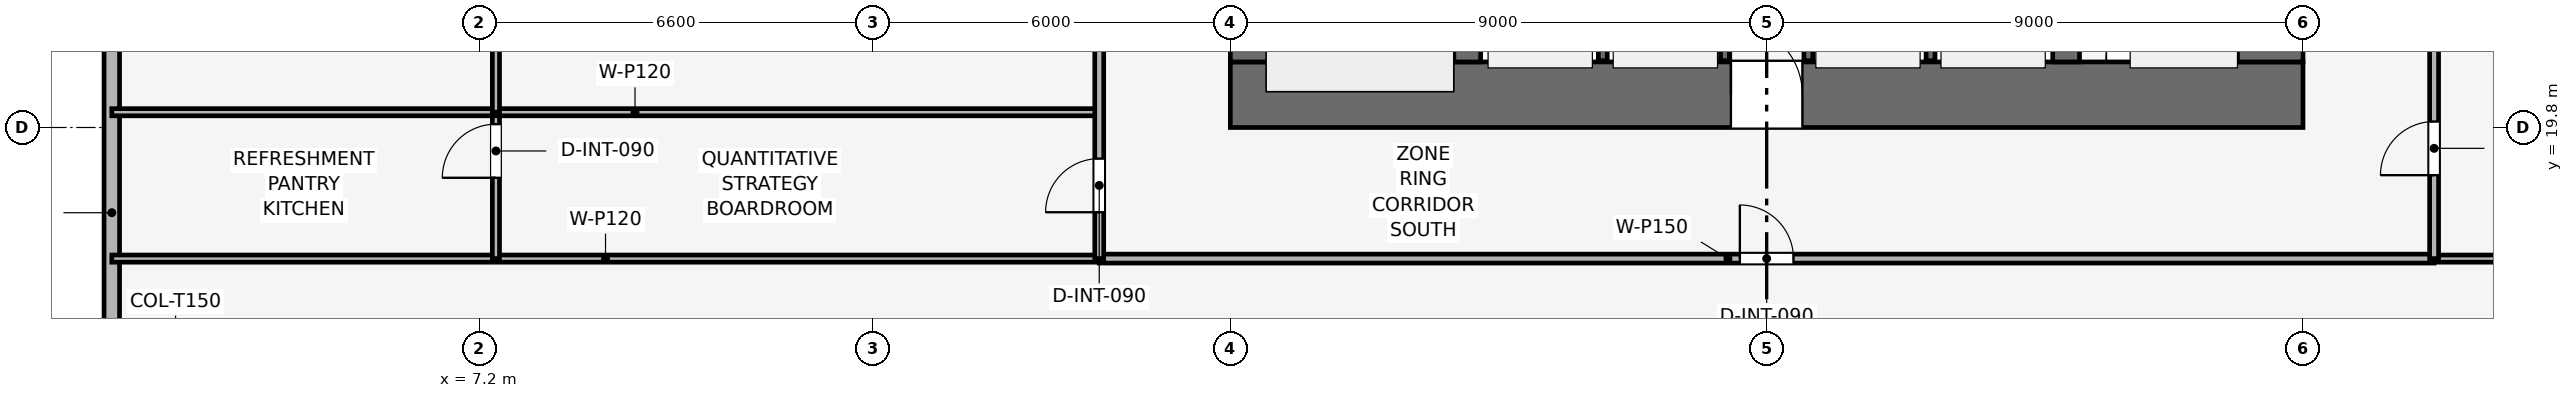
"""IFC4 building model, lengths in metres.
Left out: names, types, materials, properties, quantities, classifications, styles, units other than length and angle.
Written with IfcOpenShell. Run it as: python <this file> out.ifc"""

import sys

from ifc_helpers import new_model, si_unit, direction, frame, frame_2d, origin, place, context, subcontext, project, spatial, rectangle, extrude, element, fill, save


model = new_model("IFC4")
c1 = context("Model", 3, precision=1e-05, world=origin(), true_north=direction((0.0, 1.0)))
c2 = subcontext(c1, "Body", "Model", "MODEL_VIEW")
j1 = project(units=[si_unit("LENGTHUNIT", "METRE"), si_unit("PLANEANGLEUNIT", "RADIAN")], contexts=[c1])
p1 = place(None, origin())
s1 = spatial("IfcSite", under=j1, at=p1, CompositionType="ELEMENT")
p2 = place(p1, origin())
s2 = spatial("IfcBuilding", under=s1, at=p2, CompositionType="ELEMENT")
p3 = place(p2, frame((0.0, 0.0, 100.2)))
s3 = spatial("IfcBuildingStorey", under=s2, at=p3, CompositionType="ELEMENT", Elevation=100.2)
p4 = place(p3, frame((19.8, 20.35, 0.0), z_axis=(0.0, 0.0, 1.0), x_axis=(1.0, 0.0, 0.0)))
e1 = element("IfcWall", 1, at=p4, inside=s3, PredefinedType="SHEAR", context=c2, shape_type="SweptSolid", body=[
    extrude(rectangle(XDim=18.0, YDim=1.1, at=frame_2d((9.0, 0.0))), origin(), (0.0, 0.0, 1.0), 3.9),
])
p5 = place(p4, frame((8.4, 0.0, 0.0)))
e2 = element("IfcOpeningElement", 2, at=p5, cuts=e1, PredefinedType="OPENING", context=c2, shape_type="SweptSolid", body=[
    extrude(rectangle(XDim=1.2, YDim=2.2, at=frame_2d((0.6, 1.1))), frame((0.0, 0.56, 0.0), z_axis=(0.0, -1.0, 0.0), x_axis=(1.0, 0.0, 0.0)), (0.0, 0.0, 1.0), 1.12),
])
p6 = place(p3, frame((20.35, 20.9, 0.0), z_axis=(0.0, 0.0, 1.0), x_axis=(0.0, 1.0, 0.0)))
e3 = element("IfcWall", 3, at=p6, inside=s3, PredefinedType="SHEAR", context=c2, shape_type="SweptSolid", body=[
    extrude(rectangle(XDim=15.8, YDim=1.1, at=frame_2d((7.9, 0.0))), origin(), (0.0, 0.0, 1.0), 3.9),
])
p7 = place(p6, frame((9.9, 0.0, 0.0)))
e4 = element("IfcOpeningElement", 4, at=p7, cuts=e3, PredefinedType="OPENING", context=c2, shape_type="SweptSolid", body=[
    extrude(rectangle(XDim=1.1, YDim=2.15, at=frame_2d((0.55, 1.075))), frame((0.0, 0.56, 0.0), z_axis=(0.0, -1.0, 0.0), x_axis=(1.0, 0.0, 0.0)), (0.0, 0.0, 1.0), 1.12),
])
p8 = place(p3, frame((37.25, 20.9, 0.0), z_axis=(0.0, 0.0, 1.0), x_axis=(0.0, 1.0, 0.0)))
e5 = element("IfcWall", 5, at=p8, inside=s3, PredefinedType="SHEAR", context=c2, shape_type="SweptSolid", body=[
    extrude(rectangle(XDim=15.8, YDim=1.1, at=frame_2d((7.9, 0.0))), origin(), (0.0, 0.0, 1.0), 3.9),
])
p9 = place(p8, frame((4.4, 0.0, 0.0)))
e6 = element("IfcOpeningElement", 6, at=p9, cuts=e5, PredefinedType="OPENING", context=c2, shape_type="SweptSolid", body=[
    extrude(rectangle(XDim=1.1, YDim=2.15, at=frame_2d((0.55, 1.075))), frame((0.0, 0.56, 0.0), z_axis=(0.0, -1.0, 0.0), x_axis=(1.0, 0.0, 0.0)), (0.0, 0.0, 1.0), 1.12),
])
for number, where, z_axis, x_axis in (
    (7, (23.775, 20.9, 0.0), (0.0, 0.0, 1.0), (0.0, 1.0, 0.0)),
    (8, (33.825, 20.9, 0.0), (0.0, 0.0, 1.0), (0.0, 1.0, 0.0)),
):
    element("IfcWall", number, at=place(p3, frame(where, z_axis=z_axis, x_axis=x_axis)), inside=s3, PredefinedType="SHEAR", context=c2, shape_type="SweptSolid", body=[
        extrude(rectangle(XDim=15.8, YDim=0.45, at=frame_2d((7.9, 0.0))), origin(), (0.0, 0.0, 1.0), 3.9),
    ])
p10 = place(p3, frame((1.03, 8.7, 0.0), z_axis=(0.0, 0.0, 1.0), x_axis=(0.0, 1.0, 0.0)))
e9 = element("IfcWall", 9, at=p10, inside=s3, PredefinedType="SOLIDWALL", context=c2, shape_type="SweptSolid", body=[
    extrude(rectangle(XDim=15.3, YDim=0.26, at=frame_2d((7.65, 0.0))), origin(), (0.0, 0.0, 1.0), 3.65),
])
p11 = place(p10, frame((0.25, 0.0, 0.9)))
e10 = element("IfcOpeningElement", 10, at=p11, cuts=e9, PredefinedType="OPENING", context=c2, shape_type="SweptSolid", body=[
    extrude(rectangle(XDim=3.8, YDim=1.9, at=frame_2d((1.9, 0.95))), frame((0.0, 0.14, 0.0), z_axis=(0.0, -1.0, 0.0), x_axis=(1.0, 0.0, 0.0)), (0.0, 0.0, 1.0), 0.28),
])
for number, where, z_axis, x_axis in (
    (11, (26.05, 20.92, 0.0), (0.0, 0.0, 1.0), (0.0, 1.0, 0.0)),
    (12, (28.1, 20.92, 0.0), (0.0, 0.0, 1.0), (0.0, 1.0, 0.0)),
    (13, (29.5, 20.92, 0.0), (0.0, 0.0, 1.0), (0.0, 1.0, 0.0)),
    (14, (31.55, 20.92, 0.0), (0.0, 0.0, 1.0), (0.0, 1.0, 0.0)),
):
    element("IfcWall", number, at=place(p3, frame(where, z_axis=z_axis, x_axis=x_axis)), inside=s3, PredefinedType="SHEAR", context=c2, shape_type="SweptSolid", body=[
        extrude(rectangle(XDim=2.06, YDim=0.15, at=frame_2d((1.03, 0.0))), origin(), (0.0, 0.0, 1.0), 3.65),
    ])
for number, where, z_axis, x_axis in (
    (15, (1.03, 17.6, 0.0), (0.0, 0.0, 1.0), (1.0, 0.0, 0.0)),
    (16, (40.0, 17.6, 0.0), (0.0, 0.0, 1.0), (1.0, 0.0, 0.0)),
):
    element("IfcWall", number, at=place(p3, frame(where, z_axis=z_axis, x_axis=x_axis)), inside=s3, PredefinedType="PARTITIONING", context=c2, shape_type="SweptSolid", body=[
        extrude(rectangle(XDim=16.57, YDim=0.12, at=frame_2d((8.285, 0.0))), origin(), (0.0, 0.0, 1.0), 2.935),
    ])
p12 = place(p3, frame((7.476, 17.6, 0.0), z_axis=(0.0, 0.0, 1.0), x_axis=(0.0, 1.0, 0.0)))
e17 = element("IfcWall", 17, at=p12, inside=s3, PredefinedType="PARTITIONING", context=c2, shape_type="SweptSolid", body=[
    extrude(rectangle(XDim=2.456, YDim=0.12, at=frame_2d((1.228, 0.0))), origin(), (0.0, 0.0, 1.0), 3.65),
])
p13 = place(p12, frame((1.356, 0.0, 0.0)))
e18 = element("IfcOpeningElement", 18, at=p13, cuts=e17, PredefinedType="OPENING", context=c2, shape_type="SweptSolid", body=[
    extrude(rectangle(XDim=0.9, YDim=2.1, at=frame_2d((0.45, 1.05))), frame((0.0, 0.07, 0.0), z_axis=(0.0, -1.0, 0.0), x_axis=(1.0, 0.0, 0.0)), (0.0, 0.0, 1.0), 0.14),
])
p14 = place(p3, frame((1.03, 20.056, 0.0), z_axis=(0.0, 0.0, 1.0), x_axis=(1.0, 0.0, 0.0)))
e19 = element("IfcWall", 19, at=p14, inside=s3, PredefinedType="PARTITIONING", context=c2, shape_type="SweptSolid", body=[
    extrude(rectangle(XDim=16.57, YDim=0.12, at=frame_2d((8.285, 0.0))), origin(), (0.0, 0.0, 1.0), 2.935),
])
p15 = place(p3, frame((7.476, 20.056, 0.0), z_axis=(0.0, 0.0, 1.0), x_axis=(0.0, 1.0, 0.0)))
e20 = element("IfcWall", 20, at=p15, inside=s3, PredefinedType="PARTITIONING", context=c2, shape_type="SweptSolid", body=[
    extrude(rectangle(XDim=8.731, YDim=0.12, at=frame_2d((4.366, 0.0))), origin(), (0.0, 0.0, 1.0), 3.085),
])
p16 = place(p15, frame((1.438, 0.0, 0.0)))
e21 = element("IfcOpeningElement", 21, at=p16, cuts=e20, PredefinedType="OPENING", context=c2, shape_type="SweptSolid", body=[
    extrude(rectangle(XDim=0.9, YDim=2.1, at=frame_2d((0.45, 1.05))), frame((0.0, 0.07, 0.0), z_axis=(0.0, -1.0, 0.0), x_axis=(1.0, 0.0, 0.0)), (0.0, 0.0, 1.0), 0.14),
])
p17 = place(p3, frame((17.6, 17.6, 0.0), z_axis=(0.0, 0.0, 1.0), x_axis=(1.0, 0.0, 0.0)))
e22 = element("IfcWall", 22, at=p17, inside=s3, PredefinedType="PARTITIONING", context=c2, shape_type="SweptSolid", body=[
    extrude(rectangle(XDim=22.4, YDim=0.15, at=frame_2d((11.2, 0.0))), origin(), (0.0, 0.0, 1.0), 3.085),
])
p18 = place(p17, frame((10.75, 0.0, 0.0)))
e23 = element("IfcOpeningElement", 23, at=p18, cuts=e22, PredefinedType="OPENING", context=c2, shape_type="SweptSolid", body=[
    extrude(rectangle(XDim=0.9, YDim=2.1, at=frame_2d((0.45, 1.05))), frame((0.0, 0.085, 0.0), z_axis=(0.0, -1.0, 0.0), x_axis=(1.0, 0.0, 0.0)), (0.0, 0.0, 1.0), 0.17),
])
p19 = place(p3, frame((17.6, 17.6, 0.0), z_axis=(0.0, 0.0, 1.0), x_axis=(0.0, 1.0, 0.0)))
e24 = element("IfcWall", 24, at=p19, inside=s3, PredefinedType="PARTITIONING", context=c2, shape_type="SweptSolid", body=[
    extrude(rectangle(XDim=22.4, YDim=0.15, at=frame_2d((11.2, 0.0))), origin(), (0.0, 0.0, 1.0), 3.085),
])
p20 = place(p19, frame((0.778, 0.0, 0.0)))
e25 = element("IfcOpeningElement", 25, at=p20, cuts=e24, PredefinedType="OPENING", context=c2, shape_type="SweptSolid", body=[
    extrude(rectangle(XDim=0.9, YDim=2.1, at=frame_2d((0.45, 1.05))), frame((0.0, 0.085, 0.0), z_axis=(0.0, -1.0, 0.0), x_axis=(1.0, 0.0, 0.0)), (0.0, 0.0, 1.0), 0.17),
])
p21 = place(p19, frame((6.372, 0.0, 0.0)))
e26 = element("IfcOpeningElement", 26, at=p21, cuts=e24, PredefinedType="OPENING", context=c2, shape_type="SweptSolid", body=[
    extrude(rectangle(XDim=0.9, YDim=2.1, at=frame_2d((0.45, 1.05))), frame((0.0, 0.085, 0.0), z_axis=(0.0, -1.0, 0.0), x_axis=(1.0, 0.0, 0.0)), (0.0, 0.0, 1.0), 0.17),
])
p22 = place(p19, frame((16.343, 0.0, 0.0)))
e27 = element("IfcOpeningElement", 27, at=p22, cuts=e24, PredefinedType="OPENING", context=c2, shape_type="SweptSolid", body=[
    extrude(rectangle(XDim=0.9, YDim=2.1, at=frame_2d((0.45, 1.05))), frame((0.0, 0.085, 0.0), z_axis=(0.0, -1.0, 0.0), x_axis=(1.0, 0.0, 0.0)), (0.0, 0.0, 1.0), 0.17),
])
p23 = place(p3, frame((40.0, 17.6, 0.0), z_axis=(0.0, 0.0, 1.0), x_axis=(0.0, 1.0, 0.0)))
e28 = element("IfcWall", 28, at=p23, inside=s3, PredefinedType="PARTITIONING", context=c2, shape_type="SweptSolid", body=[
    extrude(rectangle(XDim=22.4, YDim=0.15, at=frame_2d((11.2, 0.0))), origin(), (0.0, 0.0, 1.0), 3.085),
])
p24 = place(p23, frame((1.4, 0.0, 0.0)))
e29 = element("IfcOpeningElement", 29, at=p24, cuts=e28, PredefinedType="OPENING", context=c2, shape_type="SweptSolid", body=[
    extrude(rectangle(XDim=0.9, YDim=2.1, at=frame_2d((0.45, 1.05))), frame((0.0, 0.085, 0.0), z_axis=(0.0, -1.0, 0.0), x_axis=(1.0, 0.0, 0.0)), (0.0, 0.0, 1.0), 0.17),
])
p25 = place(p23, frame((4.65, 0.0, 0.0)))
e30 = element("IfcOpeningElement", 30, at=p25, cuts=e28, PredefinedType="OPENING", context=c2, shape_type="SweptSolid", body=[
    extrude(rectangle(XDim=0.9, YDim=2.1, at=frame_2d((0.45, 1.05))), frame((0.0, 0.085, 0.0), z_axis=(0.0, -1.0, 0.0), x_axis=(1.0, 0.0, 0.0)), (0.0, 0.0, 1.0), 0.17),
])
p26 = place(p23, frame((7.55, 0.0, 0.0)))
e31 = element("IfcOpeningElement", 31, at=p26, cuts=e28, PredefinedType="OPENING", context=c2, shape_type="SweptSolid", body=[
    extrude(rectangle(XDim=0.9, YDim=2.1, at=frame_2d((0.45, 1.05))), frame((0.0, 0.085, 0.0), z_axis=(0.0, -1.0, 0.0), x_axis=(1.0, 0.0, 0.0)), (0.0, 0.0, 1.0), 0.17),
])
p27 = place(p23, frame((10.3, 0.0, 0.0)))
e32 = element("IfcOpeningElement", 32, at=p27, cuts=e28, PredefinedType="OPENING", context=c2, shape_type="SweptSolid", body=[
    extrude(rectangle(XDim=0.95, YDim=2.1, at=frame_2d((0.475, 1.05))), frame((0.0, 0.085, 0.0), z_axis=(0.0, -1.0, 0.0), x_axis=(1.0, 0.0, 0.0)), (0.0, 0.0, 1.0), 0.17),
])
p28 = place(p23, frame((16.8, 0.0, 0.0)))
e33 = element("IfcOpeningElement", 33, at=p28, cuts=e28, PredefinedType="OPENING", context=c2, shape_type="SweptSolid", body=[
    extrude(rectangle(XDim=0.9, YDim=2.1, at=frame_2d((0.45, 1.05))), frame((0.0, 0.085, 0.0), z_axis=(0.0, -1.0, 0.0), x_axis=(1.0, 0.0, 0.0)), (0.0, 0.0, 1.0), 0.17),
])
p29 = place(p13, origin())
e34 = element("IfcDoor", 34, at=p29, inside=s3, OperationType="SINGLE_SWING_LEFT", PredefinedType="DOOR", context=c2, shape_type="SweptSolid", body=[
    extrude(rectangle(XDim=0.9, YDim=2.1, at=frame_2d((0.45, 1.05))), frame((0.0, 0.025, 0.0), z_axis=(0.0, -1.0, 0.0), x_axis=(1.0, 0.0, 0.0)), (0.0, 0.0, 1.0), 0.05),
])
fill(e18, e34)
p30 = place(p18, origin())
e35 = element("IfcDoor", 35, at=p30, inside=s3, OperationType="SINGLE_SWING_LEFT", PredefinedType="DOOR", context=c2, shape_type="SweptSolid", body=[
    extrude(rectangle(XDim=0.9, YDim=2.1, at=frame_2d((0.45, 1.05))), frame((0.0, 0.025, 0.0), z_axis=(0.0, -1.0, 0.0), x_axis=(1.0, 0.0, 0.0)), (0.0, 0.0, 1.0), 0.05),
])
fill(e23, e35)
p31 = place(p20, origin())
e36 = element("IfcDoor", 36, at=p31, inside=s3, OperationType="SINGLE_SWING_LEFT", PredefinedType="DOOR", context=c2, shape_type="SweptSolid", body=[
    extrude(rectangle(XDim=0.9, YDim=2.1, at=frame_2d((0.45, 1.05))), frame((0.0, 0.025, 0.0), z_axis=(0.0, -1.0, 0.0), x_axis=(1.0, 0.0, 0.0)), (0.0, 0.0, 1.0), 0.05),
])
fill(e25, e36)
p32 = place(p24, origin())
e37 = element("IfcDoor", 37, at=p32, inside=s3, OperationType="SINGLE_SWING_LEFT", PredefinedType="DOOR", context=c2, shape_type="SweptSolid", body=[
    extrude(rectangle(XDim=0.9, YDim=2.1, at=frame_2d((0.45, 1.05))), frame((0.0, 0.025, 0.0), z_axis=(0.0, -1.0, 0.0), x_axis=(1.0, 0.0, 0.0)), (0.0, 0.0, 1.0), 0.05),
])
fill(e29, e37)
p33 = place(p5, origin())
e38 = element("IfcDoor", 38, at=p33, inside=s3, OperationType="SINGLE_SWING_LEFT", PredefinedType="DOOR", context=c2, shape_type="SweptSolid", body=[
    extrude(rectangle(XDim=1.2, YDim=2.2, at=frame_2d((0.6, 1.1))), frame((0.0, 0.025, 0.0), z_axis=(0.0, -1.0, 0.0), x_axis=(1.0, 0.0, 0.0)), (0.0, 0.0, 1.0), 0.05),
])
fill(e2, e38)
save(model, sys.argv[1])
